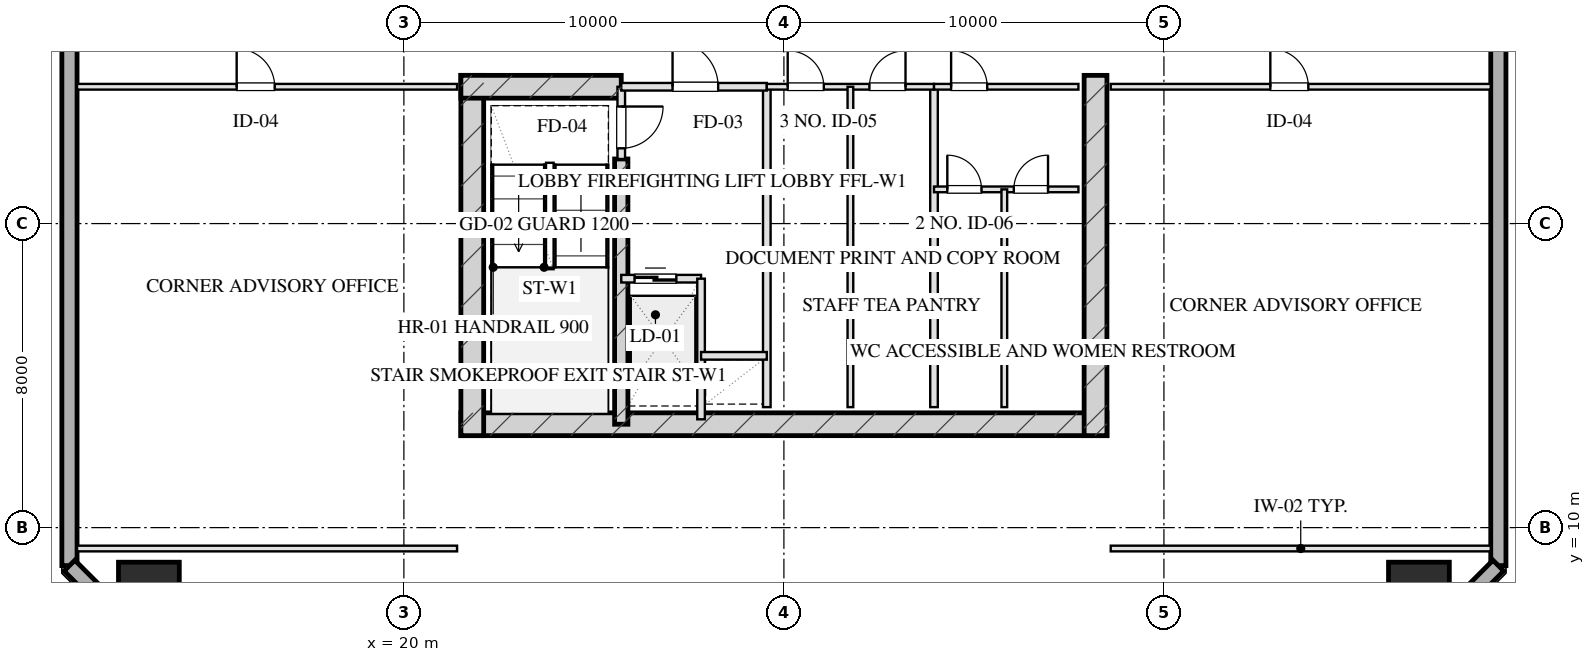
"""IFC4 building model, lengths in metres.
Left out: names, types, materials, properties, quantities, classifications, styles, units other than length and angle.
Written with IfcOpenShell. Run it as: python <this file> out.ifc"""

import sys

from ifc_helpers import new_model, si_unit, direction, frame, frame_2d, origin, origin_2d, place, context, subcontext, project, spatial, rectangle, hollow_rectangle, extrude, element, fill, save


model = new_model("IFC4")
c1 = context("Model", 3, precision=1e-05, world=origin(), true_north=direction((0.0, 1.0)))
c2 = subcontext(c1, "Body", "Model", "MODEL_VIEW")
j1 = project(units=[si_unit("LENGTHUNIT", "METRE"), si_unit("PLANEANGLEUNIT", "RADIAN")], contexts=[c1])
p1 = place(None, origin())
s1 = spatial("IfcSite", under=j1, at=p1, CompositionType="ELEMENT")
p2 = place(p1, origin())
s2 = spatial("IfcBuilding", under=s1, at=p2, CompositionType="ELEMENT")
p3 = place(p2, frame((0.0, 0.0, 110.4)))
s3 = spatial("IfcBuildingStorey", under=s2, at=p3, CompositionType="ELEMENT", Elevation=110.4)
p4 = place(p3, frame((21.5, 12.72, 0.0), z_axis=(0.0, 0.0, 1.0), x_axis=(1.0, 0.0, 0.0)))
e1 = element("IfcWall", 1, at=p4, inside=s3, PredefinedType="SHEAR", context=c2, shape_type="SweptSolid", body=[
    extrude(rectangle(XDim=17.0, YDim=0.6, at=frame_2d((8.5, 0.0))), origin(), (0.0, 0.0, 1.0), 3.45),
])
for number, where, z_axis, x_axis in (
    (2, (21.8, 21.9, 0.0), (0.0, 0.0, 1.0), (0.0, -1.0, 0.0)),
    (3, (38.2, 21.9, 0.0), (0.0, 0.0, 1.0), (0.0, -1.0, 0.0)),
):
    element("IfcWall", number, at=place(p3, frame(where, z_axis=z_axis, x_axis=x_axis)), inside=s3, PredefinedType="SHEAR", context=c2, shape_type="SweptSolid", body=[
        extrude(rectangle(XDim=9.48, YDim=0.6, at=frame_2d((4.74, 0.0))), origin(), (0.0, 0.0, 1.0), 3.45),
    ])
p5 = place(p3, frame((25.72, 19.7, 0.0), z_axis=(0.0, 0.0, 1.0), x_axis=(0.0, -1.0, 0.0)))
e4 = element("IfcWall", 4, at=p5, inside=s3, PredefinedType="SHEAR", context=c2, shape_type="SweptSolid", body=[
    extrude(rectangle(XDim=6.98, YDim=0.35, at=frame_2d((3.49, 0.0))), origin(), (0.0, 0.0, 1.0), 3.45),
])
p6 = place(p3, frame((21.5, 21.6, 0.0), z_axis=(0.0, 0.0, 1.0), x_axis=(1.0, 0.0, 0.0)))
e5 = element("IfcWall", 5, at=p6, inside=s3, PredefinedType="SHEAR", context=c2, shape_type="SweptSolid", body=[
    extrude(rectangle(XDim=4.22, YDim=0.6, at=frame_2d((2.11, 0.0))), origin(), (0.0, 0.0, 1.0), 3.45),
])
for number, where, z_axis, x_axis in (
    (6, (13.29, 8.29, 0.0), (0.0, 0.0, 1.0), (1.0, 0.0, 0.0)),
    (7, (46.71, 8.29, 0.0), (0.0, 0.0, 1.0), (1.0, 0.0, 0.0)),
):
    element("IfcColumn", number, at=place(p3, frame(where, z_axis=z_axis, x_axis=x_axis)), inside=s3, PredefinedType="COLUMN", context=c2, shape_type="SweptSolid", body=[
        extrude(hollow_rectangle(XDim=1.6, YDim=1.6, WallThickness=0.055, at=origin_2d()), origin(), (0.0, 0.0, 1.0), 3.451),
    ])
p7 = place(p3, frame((11.2, 9.0, 0.0), z_axis=(0.0, 0.0, 1.0), x_axis=(0.0, 1.0, 0.0)))
e8 = element("IfcWall", 8, at=p7, inside=s3, PredefinedType="SOLIDWALL", context=c2, shape_type="SweptSolid", body=[
    extrude(rectangle(XDim=50.0, YDim=0.4, at=frame_2d((25.0, 0.0))), origin(), (0.0, 0.0, 1.0), 2.61),
])
p8 = place(p7, frame((26.4, 0.0, 0.75)))
e9 = element("IfcOpeningElement", 9, at=p8, cuts=e8, PredefinedType="OPENING", context=c2, shape_type="SweptSolid", body=[
    extrude(rectangle(XDim=2.4, YDim=1.46, at=frame_2d((1.2, 0.73))), frame((0.0, 0.21, 0.0), z_axis=(0.0, -1.0, 0.0), x_axis=(1.0, 0.0, 0.0)), (0.0, 0.0, 1.0), 0.42),
])
p9 = place(p7, frame((18.65, 0.0, 0.0)))
e10 = element("IfcOpeningElement", 10, at=p9, cuts=e8, PredefinedType="OPENING", context=c2, shape_type="SweptSolid", body=[
    extrude(rectangle(XDim=1.1, YDim=2.15, at=frame_2d((0.55, 1.075))), frame((0.0, 0.21, 0.0), z_axis=(0.0, -1.0, 0.0), x_axis=(1.0, 0.0, 0.0)), (0.0, 0.0, 1.0), 0.42),
])
p10 = place(p3, frame((48.8, 59.0, 0.0), z_axis=(0.0, 0.0, 1.0), x_axis=(0.0, -1.0, 0.0)))
e11 = element("IfcWall", 11, at=p10, inside=s3, PredefinedType="SOLIDWALL", context=c2, shape_type="SweptSolid", body=[
    extrude(rectangle(XDim=50.0, YDim=0.4, at=frame_2d((25.0, 0.0))), origin(), (0.0, 0.0, 1.0), 2.61),
])
p11 = place(p10, frame((17.4, 0.0, 0.75)))
e12 = element("IfcOpeningElement", 12, at=p11, cuts=e11, PredefinedType="OPENING", context=c2, shape_type="SweptSolid", body=[
    extrude(rectangle(XDim=2.4, YDim=1.46, at=frame_2d((1.2, 0.73))), frame((0.0, 0.21, 0.0), z_axis=(0.0, -1.0, 0.0), x_axis=(1.0, 0.0, 0.0)), (0.0, 0.0, 1.0), 0.42),
])
p12 = place(p10, frame((30.226, 0.0, 0.0)))
e13 = element("IfcOpeningElement", 13, at=p12, cuts=e11, PredefinedType="OPENING", context=c2, shape_type="SweptSolid", body=[
    extrude(rectangle(XDim=1.1, YDim=2.15, at=frame_2d((0.55, 1.075))), frame((0.0, 0.21, 0.0), z_axis=(0.0, -1.0, 0.0), x_axis=(1.0, 0.0, 0.0)), (0.0, 0.0, 1.0), 0.42),
])
for number, where, z_axis, x_axis in (
    (14, (48.8, 9.0, 0.0), (0.0, 0.0, 1.0), (-0.707, -0.707, 0.0)),
    (15, (14.0, 6.2, 0.0), (0.0, 0.0, 1.0), (-0.707, 0.707, 0.0)),
):
    element("IfcWall", number, at=place(p3, frame(where, z_axis=z_axis, x_axis=x_axis)), inside=s3, PredefinedType="SOLIDWALL", context=c2, shape_type="SweptSolid", body=[
        extrude(rectangle(XDim=3.96, YDim=0.4, at=frame_2d((1.98, 0.0))), origin(), (0.0, 0.0, 1.0), 2.61),
    ])
p13 = place(p3, frame((25.72, 21.6, 0.0), z_axis=(0.0, 0.0, 1.0), x_axis=(0.0, -1.0, 0.0)))
e16 = element("IfcWall", 16, at=p13, inside=s3, PredefinedType="PARTITIONING", context=c2, shape_type="SweptSolid", body=[
    extrude(rectangle(XDim=1.9, YDim=0.2, at=frame_2d((0.95, 0.0))), origin(), (0.0, 0.0, 1.0), 3.175),
])
p14 = place(p13, frame((0.52, 0.0, 0.0)))
e17 = element("IfcOpeningElement", 17, at=p14, cuts=e16, PredefinedType="OPENING", context=c2, shape_type="SweptSolid", body=[
    extrude(rectangle(XDim=1.1, YDim=2.05, at=frame_2d((0.55, 1.025))), frame((0.0, 0.11, 0.0), z_axis=(0.0, -1.0, 0.0), x_axis=(1.0, 0.0, 0.0)), (0.0, 0.0, 1.0), 0.22),
])
p15 = place(p3, frame((29.55, 21.6, 0.0), z_axis=(0.0, 0.0, 1.0), x_axis=(0.0, -1.0, 0.0)))
e18 = element("IfcWall", 18, at=p15, inside=s3, PredefinedType="PARTITIONING", context=c2, shape_type="SweptSolid", body=[
    extrude(rectangle(XDim=8.43, YDim=0.2, at=frame_2d((4.215, 0.0))), origin(), (0.0, 0.0, 1.0), 3.175),
])
p16 = place(p3, frame((25.72, 21.6, 0.0), z_axis=(0.0, 0.0, 1.0), x_axis=(1.0, 0.0, 0.0)))
e19 = element("IfcWall", 19, at=p16, inside=s3, PredefinedType="PARTITIONING", context=c2, shape_type="SweptSolid", body=[
    extrude(rectangle(XDim=3.83, YDim=0.2, at=frame_2d((1.915, 0.0))), origin(), (0.0, 0.0, 1.0), 3.175),
])
p17 = place(p16, frame((1.35, 0.0, 0.0)))
e20 = element("IfcOpeningElement", 20, at=p17, cuts=e19, PredefinedType="OPENING", context=c2, shape_type="SweptSolid", body=[
    extrude(rectangle(XDim=1.2, YDim=2.05, at=frame_2d((0.6, 1.025))), frame((0.0, 0.11, 0.0), z_axis=(0.0, -1.0, 0.0), x_axis=(1.0, 0.0, 0.0)), (0.0, 0.0, 1.0), 0.22),
])
p18 = place(p3, frame((25.72, 16.55, 0.0), z_axis=(0.0, 0.0, 1.0), x_axis=(1.0, 0.0, 0.0)))
e21 = element("IfcWall", 21, at=p18, inside=s3, PredefinedType="PARTITIONING", context=c2, shape_type="SweptSolid", body=[
    extrude(rectangle(XDim=2.1, YDim=0.2, at=frame_2d((1.05, 0.0))), origin(), (0.0, 0.0, 1.0), 3.175),
])
p19 = place(p18, frame((0.35, 0.0, 0.0)))
e22 = element("IfcOpeningElement", 22, at=p19, cuts=e21, PredefinedType="OPENING", context=c2, shape_type="SweptSolid", body=[
    extrude(rectangle(XDim=1.1, YDim=2.05, at=frame_2d((0.55, 1.025))), frame((0.0, 0.11, 0.0), z_axis=(0.0, -1.0, 0.0), x_axis=(1.0, 0.0, 0.0)), (0.0, 0.0, 1.0), 0.22),
])
p20 = place(p3, frame((27.82, 16.55, 0.0), z_axis=(0.0, 0.0, 1.0), x_axis=(0.0, -1.0, 0.0)))
e23 = element("IfcWall", 23, at=p20, inside=s3, PredefinedType="PARTITIONING", context=c2, shape_type="SweptSolid", body=[
    extrude(rectangle(XDim=3.7, YDim=0.2, at=frame_2d((1.85, 0.0))), origin(), (0.0, 0.0, 1.0), 3.175),
])
p21 = place(p3, frame((27.82, 14.52, 0.0), z_axis=(0.0, 0.0, 1.0), x_axis=(1.0, 0.0, 0.0)))
e24 = element("IfcWall", 24, at=p21, inside=s3, PredefinedType="PARTITIONING", context=c2, shape_type="SweptSolid", body=[
    extrude(rectangle(XDim=1.73, YDim=0.2, at=frame_2d((0.865, 0.0))), origin(), (0.0, 0.0, 1.0), 3.175),
])
p22 = place(p3, frame((33.95, 21.6, 0.0), z_axis=(0.0, 0.0, 1.0), x_axis=(0.0, -1.0, 0.0)))
e25 = element("IfcWall", 25, at=p22, inside=s3, PredefinedType="PARTITIONING", context=c2, shape_type="SweptSolid", body=[
    extrude(rectangle(XDim=8.43, YDim=0.2, at=frame_2d((4.215, 0.0))), origin(), (0.0, 0.0, 1.0), 3.175),
])
p23 = place(p3, frame((29.55, 21.6, 0.0), z_axis=(0.0, 0.0, 1.0), x_axis=(1.0, 0.0, 0.0)))
e26 = element("IfcWall", 26, at=p23, inside=s3, PredefinedType="PARTITIONING", context=c2, shape_type="SweptSolid", body=[
    extrude(rectangle(XDim=4.4, YDim=0.15, at=frame_2d((2.2, 0.0))), origin(), (0.0, 0.0, 1.0), 3.175),
])
p24 = place(p23, frame((0.55, 0.0, 0.0)))
e27 = element("IfcOpeningElement", 27, at=p24, cuts=e26, PredefinedType="OPENING", context=c2, shape_type="SweptSolid", body=[
    extrude(rectangle(XDim=0.95, YDim=2.05, at=frame_2d((0.475, 1.025))), frame((0.0, 0.085, 0.0), z_axis=(0.0, -1.0, 0.0), x_axis=(1.0, 0.0, 0.0)), (0.0, 0.0, 1.0), 0.17),
])
p25 = place(p23, frame((2.7, 0.0, 0.0)))
e28 = element("IfcOpeningElement", 28, at=p25, cuts=e26, PredefinedType="OPENING", context=c2, shape_type="SweptSolid", body=[
    extrude(rectangle(XDim=0.95, YDim=2.05, at=frame_2d((0.475, 1.025))), frame((0.0, 0.085, 0.0), z_axis=(0.0, -1.0, 0.0), x_axis=(1.0, 0.0, 0.0)), (0.0, 0.0, 1.0), 0.17),
])
p26 = place(p3, frame((31.75, 21.6, 0.0), z_axis=(0.0, 0.0, 1.0), x_axis=(0.0, -1.0, 0.0)))
e29 = element("IfcWall", 29, at=p26, inside=s3, PredefinedType="PARTITIONING", context=c2, shape_type="SweptSolid", body=[
    extrude(rectangle(XDim=8.43, YDim=0.15, at=frame_2d((4.215, 0.0))), origin(), (0.0, 0.0, 1.0), 3.175),
])
p27 = place(p3, frame((33.95, 21.6, 0.0), z_axis=(0.0, 0.0, 1.0), x_axis=(1.0, 0.0, 0.0)))
e30 = element("IfcWall", 30, at=p27, inside=s3, PredefinedType="PARTITIONING", context=c2, shape_type="SweptSolid", body=[
    extrude(rectangle(XDim=3.8, YDim=0.15, at=frame_2d((1.9, 0.0))), origin(), (0.0, 0.0, 1.0), 3.175),
])
p28 = place(p27, frame((0.45, 0.0, 0.0)))
e31 = element("IfcOpeningElement", 31, at=p28, cuts=e30, PredefinedType="OPENING", context=c2, shape_type="SweptSolid", body=[
    extrude(rectangle(XDim=0.95, YDim=2.05, at=frame_2d((0.475, 1.025))), frame((0.0, 0.085, 0.0), z_axis=(0.0, -1.0, 0.0), x_axis=(1.0, 0.0, 0.0)), (0.0, 0.0, 1.0), 0.17),
])
p29 = place(p3, frame((33.95, 18.9, 0.0), z_axis=(0.0, 0.0, 1.0), x_axis=(1.0, 0.0, 0.0)))
e32 = element("IfcWall", 32, at=p29, inside=s3, PredefinedType="PARTITIONING", context=c2, shape_type="SweptSolid", body=[
    extrude(rectangle(XDim=3.8, YDim=0.15, at=frame_2d((1.9, 0.0))), origin(), (0.0, 0.0, 1.0), 3.175),
])
p30 = place(p29, frame((0.35, 0.0, 0.0)))
e33 = element("IfcOpeningElement", 33, at=p30, cuts=e32, PredefinedType="OPENING", context=c2, shape_type="SweptSolid", body=[
    extrude(rectangle(XDim=0.9, YDim=2.05, at=frame_2d((0.45, 1.025))), frame((0.0, 0.085, 0.0), z_axis=(0.0, -1.0, 0.0), x_axis=(1.0, 0.0, 0.0)), (0.0, 0.0, 1.0), 0.17),
])
p31 = place(p29, frame((2.1, 0.0, 0.0)))
e34 = element("IfcOpeningElement", 34, at=p31, cuts=e32, PredefinedType="OPENING", context=c2, shape_type="SweptSolid", body=[
    extrude(rectangle(XDim=0.9, YDim=2.05, at=frame_2d((0.45, 1.025))), frame((0.0, 0.085, 0.0), z_axis=(0.0, -1.0, 0.0), x_axis=(1.0, 0.0, 0.0)), (0.0, 0.0, 1.0), 0.17),
])
p32 = place(p3, frame((35.8, 18.9, 0.0), z_axis=(0.0, 0.0, 1.0), x_axis=(0.0, -1.0, 0.0)))
e35 = element("IfcWall", 35, at=p32, inside=s3, PredefinedType="PARTITIONING", context=c2, shape_type="SweptSolid", body=[
    extrude(rectangle(XDim=5.73, YDim=0.15, at=frame_2d((2.865, 0.0))), origin(), (0.0, 0.0, 1.0), 3.175),
])
p33 = place(p3, frame((11.4, 9.45, 0.0), z_axis=(0.0, 0.0, 1.0), x_axis=(1.0, 0.0, 0.0)))
e36 = element("IfcWall", 36, at=p33, inside=s3, PredefinedType="PARTITIONING", context=c2, shape_type="SweptSolid", body=[
    extrude(rectangle(XDim=10.0, YDim=0.15, at=frame_2d((5.0, 0.0))), origin(), (0.0, 0.0, 1.0), 3.175),
])
p34 = place(p3, frame((11.4, 21.6, 0.0), z_axis=(0.0, 0.0, 1.0), x_axis=(1.0, 0.0, 0.0)))
e37 = element("IfcWall", 37, at=p34, inside=s3, PredefinedType="PARTITIONING", context=c2, shape_type="SweptSolid", body=[
    extrude(rectangle(XDim=10.0, YDim=0.15, at=frame_2d((5.0, 0.0))), origin(), (0.0, 0.0, 1.0), 3.175),
])
p35 = place(p34, frame((4.2, 0.0, 0.0)))
e38 = element("IfcOpeningElement", 38, at=p35, cuts=e37, PredefinedType="OPENING", context=c2, shape_type="SweptSolid", body=[
    extrude(rectangle(XDim=1.0, YDim=2.05, at=frame_2d((0.5, 1.025))), frame((0.0, 0.085, 0.0), z_axis=(0.0, -1.0, 0.0), x_axis=(1.0, 0.0, 0.0)), (0.0, 0.0, 1.0), 0.17),
])
p36 = place(p3, frame((38.6, 9.45, 0.0), z_axis=(0.0, 0.0, 1.0), x_axis=(1.0, 0.0, 0.0)))
e39 = element("IfcWall", 39, at=p36, inside=s3, PredefinedType="PARTITIONING", context=c2, shape_type="SweptSolid", body=[
    extrude(rectangle(XDim=10.0, YDim=0.15, at=frame_2d((5.0, 0.0))), origin(), (0.0, 0.0, 1.0), 3.175),
])
p37 = place(p3, frame((38.6, 21.6, 0.0), z_axis=(0.0, 0.0, 1.0), x_axis=(1.0, 0.0, 0.0)))
e40 = element("IfcWall", 40, at=p37, inside=s3, PredefinedType="PARTITIONING", context=c2, shape_type="SweptSolid", body=[
    extrude(rectangle(XDim=10.0, YDim=0.15, at=frame_2d((5.0, 0.0))), origin(), (0.0, 0.0, 1.0), 3.175),
])
p38 = place(p37, frame((4.2, 0.0, 0.0)))
e41 = element("IfcOpeningElement", 41, at=p38, cuts=e40, PredefinedType="OPENING", context=c2, shape_type="SweptSolid", body=[
    extrude(rectangle(XDim=1.0, YDim=2.05, at=frame_2d((0.5, 1.025))), frame((0.0, 0.085, 0.0), z_axis=(0.0, -1.0, 0.0), x_axis=(1.0, 0.0, 0.0)), (0.0, 0.0, 1.0), 0.17),
])
p39 = place(p14, origin())
e42 = element("IfcDoor", 42, at=p39, inside=s3, OperationType="SINGLE_SWING_LEFT", PredefinedType="DOOR", context=c2, shape_type="SweptSolid", body=[
    extrude(rectangle(XDim=1.1, YDim=2.05, at=frame_2d((0.55, 1.025))), frame((0.0, 0.025, 0.0), z_axis=(0.0, -1.0, 0.0), x_axis=(1.0, 0.0, 0.0)), (0.0, 0.0, 1.0), 0.05),
])
fill(e17, e42)
p40 = place(p17, origin())
e43 = element("IfcDoor", 43, at=p40, inside=s3, OperationType="SINGLE_SWING_LEFT", PredefinedType="DOOR", context=c2, shape_type="SweptSolid", body=[
    extrude(rectangle(XDim=1.2, YDim=2.05, at=frame_2d((0.6, 1.025))), frame((0.0, 0.025, 0.0), z_axis=(0.0, -1.0, 0.0), x_axis=(1.0, 0.0, 0.0)), (0.0, 0.0, 1.0), 0.05),
])
fill(e20, e43)
p41 = place(p19, origin())
e44 = element("IfcDoor", 44, at=p41, inside=s3, OperationType="DOUBLE_DOOR_SLIDING", PredefinedType="DOOR", context=c2, shape_type="SweptSolid", body=[
    extrude(rectangle(XDim=1.1, YDim=2.05, at=frame_2d((0.55, 1.025))), frame((0.0, 0.025, 0.0), z_axis=(0.0, -1.0, 0.0), x_axis=(1.0, 0.0, 0.0)), (0.0, 0.0, 1.0), 0.05),
])
fill(e22, e44)
p42 = place(p24, origin())
e45 = element("IfcDoor", 45, at=p42, inside=s3, OperationType="SINGLE_SWING_LEFT", PredefinedType="DOOR", context=c2, shape_type="SweptSolid", body=[
    extrude(rectangle(XDim=0.95, YDim=2.05, at=frame_2d((0.475, 1.025))), frame((0.0, 0.025, 0.0), z_axis=(0.0, -1.0, 0.0), x_axis=(1.0, 0.0, 0.0)), (0.0, 0.0, 1.0), 0.05),
])
fill(e27, e45)
p43 = place(p25, origin())
e46 = element("IfcDoor", 46, at=p43, inside=s3, OperationType="SINGLE_SWING_RIGHT", PredefinedType="DOOR", context=c2, shape_type="SweptSolid", body=[
    extrude(rectangle(XDim=0.95, YDim=2.05, at=frame_2d((0.475, 1.025))), frame((0.0, 0.025, 0.0), z_axis=(0.0, -1.0, 0.0), x_axis=(1.0, 0.0, 0.0)), (0.0, 0.0, 1.0), 0.05),
])
fill(e28, e46)
p44 = place(p28, origin())
e47 = element("IfcDoor", 47, at=p44, inside=s3, OperationType="SINGLE_SWING_LEFT", PredefinedType="DOOR", context=c2, shape_type="SweptSolid", body=[
    extrude(rectangle(XDim=0.95, YDim=2.05, at=frame_2d((0.475, 1.025))), frame((0.0, 0.025, 0.0), z_axis=(0.0, -1.0, 0.0), x_axis=(1.0, 0.0, 0.0)), (0.0, 0.0, 1.0), 0.05),
])
fill(e31, e47)
p45 = place(p30, origin())
e48 = element("IfcDoor", 48, at=p45, inside=s3, OperationType="SINGLE_SWING_LEFT", PredefinedType="DOOR", context=c2, shape_type="SweptSolid", body=[
    extrude(rectangle(XDim=0.9, YDim=2.05, at=frame_2d((0.45, 1.025))), frame((0.0, 0.025, 0.0), z_axis=(0.0, -1.0, 0.0), x_axis=(1.0, 0.0, 0.0)), (0.0, 0.0, 1.0), 0.05),
])
fill(e33, e48)
p46 = place(p31, origin())
e49 = element("IfcDoor", 49, at=p46, inside=s3, OperationType="SINGLE_SWING_RIGHT", PredefinedType="DOOR", context=c2, shape_type="SweptSolid", body=[
    extrude(rectangle(XDim=0.9, YDim=2.05, at=frame_2d((0.45, 1.025))), frame((0.0, 0.025, 0.0), z_axis=(0.0, -1.0, 0.0), x_axis=(1.0, 0.0, 0.0)), (0.0, 0.0, 1.0), 0.05),
])
fill(e34, e49)
p47 = place(p35, origin())
e50 = element("IfcDoor", 50, at=p47, inside=s3, OperationType="SINGLE_SWING_LEFT", PredefinedType="DOOR", context=c2, shape_type="SweptSolid", body=[
    extrude(rectangle(XDim=1.0, YDim=2.05, at=frame_2d((0.5, 1.025))), frame((0.0, 0.025, 0.0), z_axis=(0.0, -1.0, 0.0), x_axis=(1.0, 0.0, 0.0)), (0.0, 0.0, 1.0), 0.05),
])
fill(e38, e50)
p48 = place(p38, origin())
e51 = element("IfcDoor", 51, at=p48, inside=s3, OperationType="SINGLE_SWING_LEFT", PredefinedType="DOOR", context=c2, shape_type="SweptSolid", body=[
    extrude(rectangle(XDim=1.0, YDim=2.05, at=frame_2d((0.5, 1.025))), frame((0.0, 0.025, 0.0), z_axis=(0.0, -1.0, 0.0), x_axis=(1.0, 0.0, 0.0)), (0.0, 0.0, 1.0), 0.05),
])
fill(e41, e51)
save(model, sys.argv[1])
